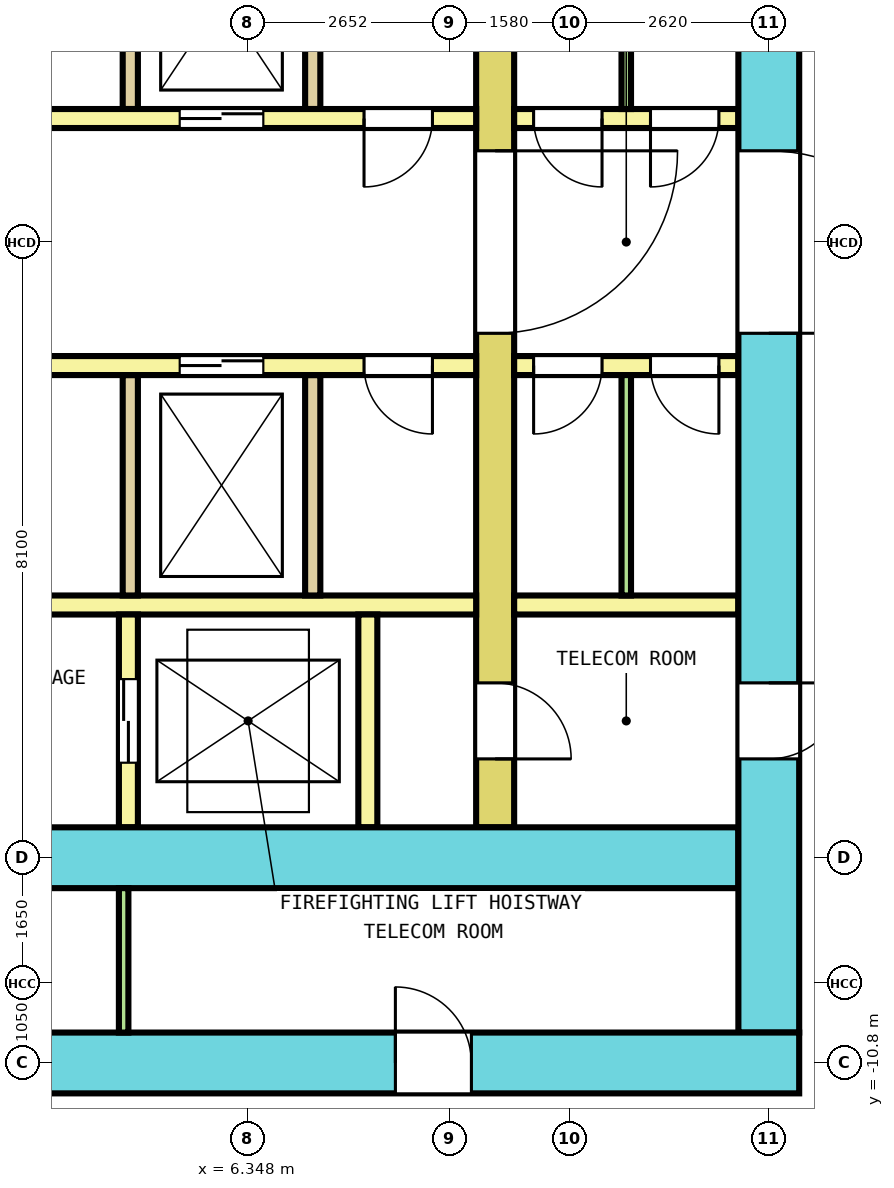
"""IFC4 building model, lengths in metres.
Left out: names, types, materials, properties, quantities, classifications, styles, units other than length and angle.
Written with IfcOpenShell. Run it as: python <this file> out.ifc"""

import sys

from ifc_helpers import new_model, si_unit, direction, frame, frame_2d, origin, place, context, subcontext, project, spatial, rectangle, extrude, element, fill, save


model = new_model("IFC4")
c1 = context("Model", 3, precision=1e-05, world=origin(), true_north=direction((0.0, 1.0)))
c2 = subcontext(c1, "Body", "Model", "MODEL_VIEW")
j1 = project(units=[si_unit("LENGTHUNIT", "METRE"), si_unit("PLANEANGLEUNIT", "RADIAN")], contexts=[c1])
p1 = place(None, origin())
s1 = spatial("IfcSite", under=j1, at=p1, CompositionType="ELEMENT")
p2 = place(p1, origin())
s2 = spatial("IfcBuilding", under=s1, at=p2, CompositionType="ELEMENT")
p3 = place(p2, frame((0.0, 0.0, 117.6)))
s3 = spatial("IfcBuildingStorey", under=s2, at=p3, CompositionType="ELEMENT", Elevation=117.6)
p4 = place(p3, frame((-13.6, -10.8, 0.0), z_axis=(0.0, 0.0, 1.0), x_axis=(1.0, 0.0, 0.0)))
e1 = element("IfcWall", 1, at=p4, inside=s3, PredefinedType="SHEAR", context=c2, shape_type="SweptSolid", body=[
    extrude(rectangle(XDim=27.2, YDim=0.8, at=frame_2d((13.6, 0.0))), origin(), (0.0, 0.0, 1.0), 4.1),
])
p5 = place(p4, frame((1.817, 0.0, 0.0)))
e2 = element("IfcOpeningElement", 2, at=p5, cuts=e1, PredefinedType="OPENING", context=c2, shape_type="SweptSolid", body=[
    extrude(rectangle(XDim=1.0, YDim=2.1, at=frame_2d((0.5, 1.05))), frame((0.0, 0.41, 0.0), z_axis=(0.0, -1.0, 0.0), x_axis=(1.0, 0.0, 0.0)), (0.0, 0.0, 1.0), 0.82),
])
p6 = place(p4, frame((4.945, 0.0, 0.0)))
e3 = element("IfcOpeningElement", 3, at=p6, cuts=e1, PredefinedType="OPENING", context=c2, shape_type="SweptSolid", body=[
    extrude(rectangle(XDim=1.0, YDim=2.1, at=frame_2d((0.5, 1.05))), frame((0.0, 0.41, 0.0), z_axis=(0.0, -1.0, 0.0), x_axis=(1.0, 0.0, 0.0)), (0.0, 0.0, 1.0), 0.82),
])
p7 = place(p4, frame((8.042, 0.0, 0.0)))
e4 = element("IfcOpeningElement", 4, at=p7, cuts=e1, PredefinedType="OPENING", context=c2, shape_type="SweptSolid", body=[
    extrude(rectangle(XDim=1.0, YDim=2.1, at=frame_2d((0.5, 1.05))), frame((0.0, 0.41, 0.0), z_axis=(0.0, -1.0, 0.0), x_axis=(1.0, 0.0, 0.0)), (0.0, 0.0, 1.0), 0.82),
])
p8 = place(p4, frame((11.139, 0.0, 0.0)))
e5 = element("IfcOpeningElement", 5, at=p8, cuts=e1, PredefinedType="OPENING", context=c2, shape_type="SweptSolid", body=[
    extrude(rectangle(XDim=1.0, YDim=2.1, at=frame_2d((0.5, 1.05))), frame((0.0, 0.41, 0.0), z_axis=(0.0, -1.0, 0.0), x_axis=(1.0, 0.0, 0.0)), (0.0, 0.0, 1.0), 0.82),
])
p9 = place(p4, frame((21.887, 0.0, 0.0)))
e6 = element("IfcOpeningElement", 6, at=p9, cuts=e1, PredefinedType="OPENING", context=c2, shape_type="SweptSolid", body=[
    extrude(rectangle(XDim=1.0, YDim=2.1, at=frame_2d((0.5, 1.05))), frame((0.0, 0.41, 0.0), z_axis=(0.0, -1.0, 0.0), x_axis=(1.0, 0.0, 0.0)), (0.0, 0.0, 1.0), 0.82),
])
p10 = place(p4, frame((15.15, 0.0, 0.0)))
e7 = element("IfcOpeningElement", 7, at=p10, cuts=e1, PredefinedType="OPENING", context=c2, shape_type="SweptSolid", body=[
    extrude(rectangle(XDim=1.2, YDim=2.1, at=frame_2d((0.6, 1.05))), frame((0.0, 0.41, 0.0), z_axis=(0.0, -1.0, 0.0), x_axis=(1.0, 0.0, 0.0)), (0.0, 0.0, 1.0), 0.82),
])
p11 = place(p3, frame((13.2, -10.4, 0.0), z_axis=(0.0, 0.0, 1.0), x_axis=(0.0, 1.0, 0.0)))
e8 = element("IfcWall", 8, at=p11, inside=s3, PredefinedType="SHEAR", context=c2, shape_type="SweptSolid", body=[
    extrude(rectangle(XDim=20.8, YDim=0.8, at=frame_2d((10.4, 0.0))), origin(), (0.0, 0.0, 1.0), 4.1),
])
p12 = place(p11, frame((9.2, 0.0, 0.0)))
e9 = element("IfcOpeningElement", 9, at=p12, cuts=e8, PredefinedType="OPENING", context=c2, shape_type="SweptSolid", body=[
    extrude(rectangle(XDim=2.4, YDim=2.1, at=frame_2d((1.2, 1.05))), frame((0.0, 0.41, 0.0), z_axis=(0.0, -1.0, 0.0), x_axis=(1.0, 0.0, 0.0)), (0.0, 0.0, 1.0), 0.82),
])
p13 = place(p11, frame((16.1, 0.0, 0.0)))
e10 = element("IfcOpeningElement", 10, at=p13, cuts=e8, PredefinedType="OPENING", context=c2, shape_type="SweptSolid", body=[
    extrude(rectangle(XDim=1.2, YDim=2.1, at=frame_2d((0.6, 1.05))), frame((0.0, 0.41, 0.0), z_axis=(0.0, -1.0, 0.0), x_axis=(1.0, 0.0, 0.0)), (0.0, 0.0, 1.0), 0.82),
])
p14 = place(p11, frame((3.6, 0.0, 0.0)))
e11 = element("IfcOpeningElement", 11, at=p14, cuts=e8, PredefinedType="OPENING", context=c2, shape_type="SweptSolid", body=[
    extrude(rectangle(XDim=1.0, YDim=2.1, at=frame_2d((0.5, 1.05))), frame((0.0, 0.41, 0.0), z_axis=(0.0, -1.0, 0.0), x_axis=(1.0, 0.0, 0.0)), (0.0, 0.0, 1.0), 0.82),
])
p15 = place(p3, frame((-12.8, -8.1, 0.0), z_axis=(0.0, 0.0, 1.0), x_axis=(1.0, 0.0, 0.0)))
e12 = element("IfcWall", 12, at=p15, inside=s3, PredefinedType="SHEAR", context=c2, shape_type="SweptSolid", body=[
    extrude(rectangle(XDim=25.6, YDim=0.8, at=frame_2d((12.8, 0.0))), origin(), (0.0, 0.0, 1.0), 4.1),
])
p16 = place(p15, frame((14.35, 0.0, 0.0)))
e13 = element("IfcOpeningElement", 13, at=p16, cuts=e12, PredefinedType="OPENING", context=c2, shape_type="SweptSolid", body=[
    extrude(rectangle(XDim=1.2, YDim=2.1, at=frame_2d((0.6, 1.05))), frame((0.0, 0.41, 0.0), z_axis=(0.0, -1.0, 0.0), x_axis=(1.0, 0.0, 0.0)), (0.0, 0.0, 1.0), 0.82),
])
p17 = place(p3, frame((9.6, -7.7, 0.0), z_axis=(0.0, 0.0, 1.0), x_axis=(0.0, 1.0, 0.0)))
e14 = element("IfcWall", 14, at=p17, inside=s3, PredefinedType="SHEAR", context=c2, shape_type="SweptSolid", body=[
    extrude(rectangle(XDim=15.4, YDim=0.5, at=frame_2d((7.7, 0.0))), origin(), (0.0, 0.0, 1.0), 4.1),
])
p18 = place(p17, frame((6.5, 0.0, 0.0)))
e15 = element("IfcOpeningElement", 15, at=p18, cuts=e14, PredefinedType="OPENING", context=c2, shape_type="SweptSolid", body=[
    extrude(rectangle(XDim=2.4, YDim=2.1, at=frame_2d((1.2, 1.05))), frame((0.0, 0.26, 0.0), z_axis=(0.0, -1.0, 0.0), x_axis=(1.0, 0.0, 0.0)), (0.0, 0.0, 1.0), 0.52),
])
p19 = place(p17, frame((13.4, 0.0, 0.0)))
e16 = element("IfcOpeningElement", 16, at=p19, cuts=e14, PredefinedType="OPENING", context=c2, shape_type="SweptSolid", body=[
    extrude(rectangle(XDim=1.2, YDim=2.1, at=frame_2d((0.6, 1.05))), frame((0.0, 0.26, 0.0), z_axis=(0.0, -1.0, 0.0), x_axis=(1.0, 0.0, 0.0)), (0.0, 0.0, 1.0), 0.52),
])
p20 = place(p17, frame((0.9, 0.0, 0.0)))
e17 = element("IfcOpeningElement", 17, at=p20, cuts=e14, PredefinedType="OPENING", context=c2, shape_type="SweptSolid", body=[
    extrude(rectangle(XDim=1.0, YDim=2.1, at=frame_2d((0.5, 1.05))), frame((0.0, 0.26, 0.0), z_axis=(0.0, -1.0, 0.0), x_axis=(1.0, 0.0, 0.0)), (0.0, 0.0, 1.0), 0.52),
])
p21 = place(p3, frame((-9.35, 1.625, 0.0), z_axis=(0.0, 0.0, 1.0), x_axis=(1.0, 0.0, 0.0)))
e18 = element("IfcWall", 18, at=p21, inside=s3, PredefinedType="SOLIDWALL", context=c2, shape_type="SweptSolid", body=[
    extrude(rectangle(XDim=18.7, YDim=0.25, at=frame_2d((9.35, 0.0))), origin(), (0.0, 0.0, 1.0), 4.1),
])
p22 = place(p21, frame((2.85, 0.0, 0.0)))
e19 = element("IfcOpeningElement", 19, at=p22, cuts=e18, PredefinedType="OPENING", context=c2, shape_type="SweptSolid", body=[
    extrude(rectangle(XDim=1.1, YDim=2.1, at=frame_2d((0.55, 1.05))), frame((0.0, 0.135, 0.0), z_axis=(0.0, -1.0, 0.0), x_axis=(1.0, 0.0, 0.0)), (0.0, 0.0, 1.0), 0.27),
])
p23 = place(p21, frame((5.15, 0.0, 0.0)))
e20 = element("IfcOpeningElement", 20, at=p23, cuts=e18, PredefinedType="OPENING", context=c2, shape_type="SweptSolid", body=[
    extrude(rectangle(XDim=1.1, YDim=2.1, at=frame_2d((0.55, 1.05))), frame((0.0, 0.135, 0.0), z_axis=(0.0, -1.0, 0.0), x_axis=(1.0, 0.0, 0.0)), (0.0, 0.0, 1.0), 0.27),
])
p24 = place(p21, frame((14.8, 0.0, 0.0)))
e21 = element("IfcOpeningElement", 21, at=p24, cuts=e18, PredefinedType="OPENING", context=c2, shape_type="SweptSolid", body=[
    extrude(rectangle(XDim=1.1, YDim=2.1, at=frame_2d((0.55, 1.05))), frame((0.0, 0.135, 0.0), z_axis=(0.0, -1.0, 0.0), x_axis=(1.0, 0.0, 0.0)), (0.0, 0.0, 1.0), 0.27),
])
p25 = place(p21, frame((0.575, 0.0, 0.0)))
e22 = element("IfcOpeningElement", 22, at=p25, cuts=e18, PredefinedType="OPENING", context=c2, shape_type="SweptSolid", body=[
    extrude(rectangle(XDim=0.9, YDim=2.1, at=frame_2d((0.45, 1.05))), frame((0.0, 0.135, 0.0), z_axis=(0.0, -1.0, 0.0), x_axis=(1.0, 0.0, 0.0)), (0.0, 0.0, 1.0), 0.27),
])
p26 = place(p21, frame((17.225, 0.0, 0.0)))
e23 = element("IfcOpeningElement", 23, at=p26, cuts=e18, PredefinedType="OPENING", context=c2, shape_type="SweptSolid", body=[
    extrude(rectangle(XDim=0.9, YDim=2.1, at=frame_2d((0.45, 1.05))), frame((0.0, 0.135, 0.0), z_axis=(0.0, -1.0, 0.0), x_axis=(1.0, 0.0, 0.0)), (0.0, 0.0, 1.0), 0.27),
])
p27 = place(p3, frame((9.85, 1.625, 0.0), z_axis=(0.0, 0.0, 1.0), x_axis=(1.0, 0.0, 0.0)))
e24 = element("IfcWall", 24, at=p27, inside=s3, PredefinedType="SOLIDWALL", context=c2, shape_type="SweptSolid", body=[
    extrude(rectangle(XDim=2.95, YDim=0.25, at=frame_2d((1.475, 0.0))), origin(), (0.0, 0.0, 1.0), 4.1),
])
p28 = place(p27, frame((0.256, 0.0, 0.0)))
e25 = element("IfcOpeningElement", 25, at=p28, cuts=e24, PredefinedType="OPENING", context=c2, shape_type="SweptSolid", body=[
    extrude(rectangle(XDim=0.9, YDim=2.1, at=frame_2d((0.45, 1.05))), frame((0.0, 0.135, 0.0), z_axis=(0.0, -1.0, 0.0), x_axis=(1.0, 0.0, 0.0)), (0.0, 0.0, 1.0), 0.27),
])
p29 = place(p27, frame((1.794, 0.0, 0.0)))
e26 = element("IfcOpeningElement", 26, at=p29, cuts=e24, PredefinedType="OPENING", context=c2, shape_type="SweptSolid", body=[
    extrude(rectangle(XDim=0.9, YDim=2.1, at=frame_2d((0.45, 1.05))), frame((0.0, 0.135, 0.0), z_axis=(0.0, -1.0, 0.0), x_axis=(1.0, 0.0, 0.0)), (0.0, 0.0, 1.0), 0.27),
])
for number, where, z_axis, x_axis in (
    (27, (4.8, 1.75, 0.0), (0.0, 0.0, 1.0), (0.0, 1.0, 0.0)),
    (28, (7.2, 1.75, 0.0), (0.0, 0.0, 1.0), (0.0, 1.0, 0.0)),
):
    element("IfcWall", number, at=place(p3, frame(where, z_axis=z_axis, x_axis=x_axis)), inside=s3, PredefinedType="SOLIDWALL", context=c2, shape_type="SweptSolid", body=[
        extrude(rectangle(XDim=2.9, YDim=0.2, at=frame_2d((1.45, 0.0))), origin(), (0.0, 0.0, 1.0), 4.1),
    ])
p30 = place(p3, frame((-9.35, -1.625, 0.0), z_axis=(0.0, 0.0, 1.0), x_axis=(1.0, 0.0, 0.0)))
e29 = element("IfcWall", 29, at=p30, inside=s3, PredefinedType="SOLIDWALL", context=c2, shape_type="SweptSolid", body=[
    extrude(rectangle(XDim=18.7, YDim=0.25, at=frame_2d((9.35, 0.0))), origin(), (0.0, 0.0, 1.0), 4.1),
])
p31 = place(p30, frame((2.85, 0.0, 0.0)))
e30 = element("IfcOpeningElement", 30, at=p31, cuts=e29, PredefinedType="OPENING", context=c2, shape_type="SweptSolid", body=[
    extrude(rectangle(XDim=1.1, YDim=2.1, at=frame_2d((0.55, 1.05))), frame((0.0, 0.135, 0.0), z_axis=(0.0, -1.0, 0.0), x_axis=(1.0, 0.0, 0.0)), (0.0, 0.0, 1.0), 0.27),
])
p32 = place(p30, frame((5.15, 0.0, 0.0)))
e31 = element("IfcOpeningElement", 31, at=p32, cuts=e29, PredefinedType="OPENING", context=c2, shape_type="SweptSolid", body=[
    extrude(rectangle(XDim=1.1, YDim=2.1, at=frame_2d((0.55, 1.05))), frame((0.0, 0.135, 0.0), z_axis=(0.0, -1.0, 0.0), x_axis=(1.0, 0.0, 0.0)), (0.0, 0.0, 1.0), 0.27),
])
p33 = place(p30, frame((14.8, 0.0, 0.0)))
e32 = element("IfcOpeningElement", 32, at=p33, cuts=e29, PredefinedType="OPENING", context=c2, shape_type="SweptSolid", body=[
    extrude(rectangle(XDim=1.1, YDim=2.1, at=frame_2d((0.55, 1.05))), frame((0.0, 0.135, 0.0), z_axis=(0.0, -1.0, 0.0), x_axis=(1.0, 0.0, 0.0)), (0.0, 0.0, 1.0), 0.27),
])
p34 = place(p30, frame((0.575, 0.0, 0.0)))
e33 = element("IfcOpeningElement", 33, at=p34, cuts=e29, PredefinedType="OPENING", context=c2, shape_type="SweptSolid", body=[
    extrude(rectangle(XDim=0.9, YDim=2.1, at=frame_2d((0.45, 1.05))), frame((0.0, 0.135, 0.0), z_axis=(0.0, -1.0, 0.0), x_axis=(1.0, 0.0, 0.0)), (0.0, 0.0, 1.0), 0.27),
])
p35 = place(p30, frame((17.225, 0.0, 0.0)))
e34 = element("IfcOpeningElement", 34, at=p35, cuts=e29, PredefinedType="OPENING", context=c2, shape_type="SweptSolid", body=[
    extrude(rectangle(XDim=0.9, YDim=2.1, at=frame_2d((0.45, 1.05))), frame((0.0, 0.135, 0.0), z_axis=(0.0, -1.0, 0.0), x_axis=(1.0, 0.0, 0.0)), (0.0, 0.0, 1.0), 0.27),
])
p36 = place(p3, frame((9.85, -1.625, 0.0), z_axis=(0.0, 0.0, 1.0), x_axis=(1.0, 0.0, 0.0)))
e35 = element("IfcWall", 35, at=p36, inside=s3, PredefinedType="SOLIDWALL", context=c2, shape_type="SweptSolid", body=[
    extrude(rectangle(XDim=2.95, YDim=0.25, at=frame_2d((1.475, 0.0))), origin(), (0.0, 0.0, 1.0), 4.1),
])
p37 = place(p36, frame((0.256, 0.0, 0.0)))
e36 = element("IfcOpeningElement", 36, at=p37, cuts=e35, PredefinedType="OPENING", context=c2, shape_type="SweptSolid", body=[
    extrude(rectangle(XDim=0.9, YDim=2.1, at=frame_2d((0.45, 1.05))), frame((0.0, 0.135, 0.0), z_axis=(0.0, -1.0, 0.0), x_axis=(1.0, 0.0, 0.0)), (0.0, 0.0, 1.0), 0.27),
])
p38 = place(p36, frame((1.794, 0.0, 0.0)))
e37 = element("IfcOpeningElement", 37, at=p38, cuts=e35, PredefinedType="OPENING", context=c2, shape_type="SweptSolid", body=[
    extrude(rectangle(XDim=0.9, YDim=2.1, at=frame_2d((0.45, 1.05))), frame((0.0, 0.135, 0.0), z_axis=(0.0, -1.0, 0.0), x_axis=(1.0, 0.0, 0.0)), (0.0, 0.0, 1.0), 0.27),
])
p39 = place(p3, frame((-9.35, -4.775, 0.0), z_axis=(0.0, 0.0, 1.0), x_axis=(1.0, 0.0, 0.0)))
e38 = element("IfcWall", 38, at=p39, inside=s3, PredefinedType="SOLIDWALL", context=c2, shape_type="SweptSolid", body=[
    extrude(rectangle(XDim=18.7, YDim=0.25, at=frame_2d((9.35, 0.0))), origin(), (0.0, 0.0, 1.0), 4.1),
])
p40 = place(p3, frame((9.85, -4.775, 0.0), z_axis=(0.0, 0.0, 1.0), x_axis=(1.0, 0.0, 0.0)))
e39 = element("IfcWall", 39, at=p40, inside=s3, PredefinedType="SOLIDWALL", context=c2, shape_type="SweptSolid", body=[
    extrude(rectangle(XDim=2.95, YDim=0.25, at=frame_2d((1.475, 0.0))), origin(), (0.0, 0.0, 1.0), 4.1),
])
for number, where, z_axis, x_axis in (
    (40, (4.8, -4.65, 0.0), (0.0, 0.0, 1.0), (0.0, 1.0, 0.0)),
    (41, (7.2, -4.65, 0.0), (0.0, 0.0, 1.0), (0.0, 1.0, 0.0)),
):
    element("IfcWall", number, at=place(p3, frame(where, z_axis=z_axis, x_axis=x_axis)), inside=s3, PredefinedType="SOLIDWALL", context=c2, shape_type="SweptSolid", body=[
        extrude(rectangle(XDim=2.9, YDim=0.2, at=frame_2d((1.45, 0.0))), origin(), (0.0, 0.0, 1.0), 4.1),
    ])
p41 = place(p3, frame((4.775, -7.7, 0.0), z_axis=(0.0, 0.0, 1.0), x_axis=(0.0, 1.0, 0.0)))
e42 = element("IfcWall", 42, at=p41, inside=s3, PredefinedType="SOLIDWALL", context=c2, shape_type="SweptSolid", body=[
    extrude(rectangle(XDim=2.8, YDim=0.25, at=frame_2d((1.4, 0.0))), origin(), (0.0, 0.0, 1.0), 4.1),
])
p42 = place(p41, frame((0.85, 0.0, 0.0)))
e43 = element("IfcOpeningElement", 43, at=p42, cuts=e42, PredefinedType="OPENING", context=c2, shape_type="SweptSolid", body=[
    extrude(rectangle(XDim=1.1, YDim=2.1, at=frame_2d((0.55, 1.05))), frame((0.0, 0.135, 0.0), z_axis=(0.0, -1.0, 0.0), x_axis=(1.0, 0.0, 0.0)), (0.0, 0.0, 1.0), 0.27),
])
p43 = place(p3, frame((7.925, -7.7, 0.0), z_axis=(0.0, 0.0, 1.0), x_axis=(0.0, 1.0, 0.0)))
e44 = element("IfcWall", 44, at=p43, inside=s3, PredefinedType="SOLIDWALL", context=c2, shape_type="SweptSolid", body=[
    extrude(rectangle(XDim=2.8, YDim=0.25, at=frame_2d((1.4, 0.0))), origin(), (0.0, 0.0, 1.0), 4.1),
])
p44 = place(p3, frame((4.712, -10.4, 0.0), z_axis=(0.0, 0.0, 1.0), x_axis=(0.0, 1.0, 0.0)))
e45 = element("IfcWall", 45, at=p44, inside=s3, PredefinedType="PARTITIONING", context=c2, shape_type="SweptSolid", body=[
    extrude(rectangle(XDim=1.9, YDim=0.125, at=frame_2d((0.95, 0.0))), origin(), (0.0, 0.0, 1.0), 3.05),
])
for number, where, z_axis, x_axis in (
    (46, (11.325, 1.75, 0.0), (0.0, 0.0, 1.0), (0.0, 1.0, 0.0)),
    (47, (11.325, -4.65, 0.0), (0.0, 0.0, 1.0), (0.0, 1.0, 0.0)),
):
    element("IfcWall", number, at=place(p3, frame(where, z_axis=z_axis, x_axis=x_axis)), inside=s3, PredefinedType="PARTITIONING", context=c2, shape_type="SweptSolid", body=[
        extrude(rectangle(XDim=2.9, YDim=0.125, at=frame_2d((1.45, 0.0))), origin(), (0.0, 0.0, 1.0), 4.1),
    ])
p45 = place(p24, origin())
e48 = element("IfcDoor", 48, at=p45, inside=s3, OperationType="DOUBLE_DOOR_SLIDING", PredefinedType="DOOR", context=c2, shape_type="SweptSolid", body=[
    extrude(rectangle(XDim=1.1, YDim=2.1, at=frame_2d((0.55, 1.05))), frame((0.0, 0.075, 0.0), z_axis=(0.0, -1.0, 0.0), x_axis=(1.0, 0.0, 0.0)), (0.0, 0.0, 1.0), 0.15),
])
fill(e21, e48)
p46 = place(p33, origin())
e49 = element("IfcDoor", 49, at=p46, inside=s3, OperationType="DOUBLE_DOOR_SLIDING", PredefinedType="DOOR", context=c2, shape_type="SweptSolid", body=[
    extrude(rectangle(XDim=1.1, YDim=2.1, at=frame_2d((0.55, 1.05))), frame((0.0, 0.075, 0.0), z_axis=(0.0, -1.0, 0.0), x_axis=(1.0, 0.0, 0.0)), (0.0, 0.0, 1.0), 0.15),
])
fill(e32, e49)
p47 = place(p42, origin())
e50 = element("IfcDoor", 50, at=p47, inside=s3, OperationType="DOUBLE_DOOR_SLIDING", PredefinedType="DOOR", context=c2, shape_type="SweptSolid", body=[
    extrude(rectangle(XDim=1.1, YDim=2.1, at=frame_2d((0.55, 1.05))), frame((0.0, 0.075, 0.0), z_axis=(0.0, -1.0, 0.0), x_axis=(1.0, 0.0, 0.0)), (0.0, 0.0, 1.0), 0.15),
])
fill(e43, e50)
p48 = place(p18, origin())
e51 = element("IfcDoor", 51, at=p48, inside=s3, OperationType="DOUBLE_DOOR_SINGLE_SWING", PredefinedType="DOOR", context=c2, shape_type="SweptSolid", body=[
    extrude(rectangle(XDim=2.4, YDim=2.1, at=frame_2d((1.2, 1.05))), frame((0.0, 0.2, 0.0), z_axis=(0.0, -1.0, 0.0), x_axis=(1.0, 0.0, 0.0)), (0.0, 0.0, 1.0), 0.4),
])
fill(e15, e51)
p49 = place(p12, origin())
e52 = element("IfcDoor", 52, at=p49, inside=s3, OperationType="DOUBLE_DOOR_SINGLE_SWING", PredefinedType="DOOR", context=c2, shape_type="SweptSolid", body=[
    extrude(rectangle(XDim=2.4, YDim=2.1, at=frame_2d((1.2, 1.05))), frame((0.0, 0.3, 0.0), z_axis=(0.0, -1.0, 0.0), x_axis=(1.0, 0.0, 0.0)), (0.0, 0.0, 1.0), 0.6),
])
fill(e9, e52)
p50 = place(p20, origin())
e53 = element("IfcDoor", 53, at=p50, inside=s3, OperationType="SINGLE_SWING_LEFT", PredefinedType="DOOR", context=c2, shape_type="SweptSolid", body=[
    extrude(rectangle(XDim=1.0, YDim=2.1, at=frame_2d((0.5, 1.05))), frame((0.0, 0.2, 0.0), z_axis=(0.0, -1.0, 0.0), x_axis=(1.0, 0.0, 0.0)), (0.0, 0.0, 1.0), 0.4),
])
fill(e17, e53)
p51 = place(p14, origin())
e54 = element("IfcDoor", 54, at=p51, inside=s3, OperationType="SINGLE_SWING_RIGHT", PredefinedType="DOOR", context=c2, shape_type="SweptSolid", body=[
    extrude(rectangle(XDim=1.0, YDim=2.1, at=frame_2d((0.5, 1.05))), frame((0.0, 0.3, 0.0), z_axis=(0.0, -1.0, 0.0), x_axis=(1.0, 0.0, 0.0)), (0.0, 0.0, 1.0), 0.6),
])
fill(e11, e54)
p52 = place(p9, origin())
e55 = element("IfcDoor", 55, at=p52, inside=s3, OperationType="SINGLE_SWING_RIGHT", PredefinedType="DOOR", context=c2, shape_type="SweptSolid", body=[
    extrude(rectangle(XDim=1.0, YDim=2.1, at=frame_2d((0.5, 1.05))), frame((0.0, 0.3, 0.0), z_axis=(0.0, -1.0, 0.0), x_axis=(1.0, 0.0, 0.0)), (0.0, 0.0, 1.0), 0.6),
])
fill(e6, e55)
p53 = place(p26, origin())
e56 = element("IfcDoor", 56, at=p53, inside=s3, OperationType="SINGLE_SWING_LEFT", PredefinedType="DOOR", context=c2, shape_type="SweptSolid", body=[
    extrude(rectangle(XDim=0.9, YDim=2.1, at=frame_2d((0.45, 1.05))), frame((0.0, 0.075, 0.0), z_axis=(0.0, -1.0, 0.0), x_axis=(1.0, 0.0, 0.0)), (0.0, 0.0, 1.0), 0.15),
])
fill(e23, e56)
p54 = place(p28, origin())
e57 = element("IfcDoor", 57, at=p54, inside=s3, OperationType="SINGLE_SWING_RIGHT", PredefinedType="DOOR", context=c2, shape_type="SweptSolid", body=[
    extrude(rectangle(XDim=0.9, YDim=2.1, at=frame_2d((0.45, 1.05))), frame((0.0, 0.075, 0.0), z_axis=(0.0, -1.0, 0.0), x_axis=(1.0, 0.0, 0.0)), (0.0, 0.0, 1.0), 0.15),
])
fill(e25, e57)
p55 = place(p29, origin())
e58 = element("IfcDoor", 58, at=p55, inside=s3, OperationType="SINGLE_SWING_LEFT", PredefinedType="DOOR", context=c2, shape_type="SweptSolid", body=[
    extrude(rectangle(XDim=0.9, YDim=2.1, at=frame_2d((0.45, 1.05))), frame((0.0, 0.075, 0.0), z_axis=(0.0, -1.0, 0.0), x_axis=(1.0, 0.0, 0.0)), (0.0, 0.0, 1.0), 0.15),
])
fill(e26, e58)
p56 = place(p35, origin())
e59 = element("IfcDoor", 59, at=p56, inside=s3, OperationType="SINGLE_SWING_LEFT", PredefinedType="DOOR", context=c2, shape_type="SweptSolid", body=[
    extrude(rectangle(XDim=0.9, YDim=2.1, at=frame_2d((0.45, 1.05))), frame((0.0, 0.075, 0.0), z_axis=(0.0, -1.0, 0.0), x_axis=(1.0, 0.0, 0.0)), (0.0, 0.0, 1.0), 0.15),
])
fill(e34, e59)
p57 = place(p37, origin())
e60 = element("IfcDoor", 60, at=p57, inside=s3, OperationType="SINGLE_SWING_RIGHT", PredefinedType="DOOR", context=c2, shape_type="SweptSolid", body=[
    extrude(rectangle(XDim=0.9, YDim=2.1, at=frame_2d((0.45, 1.05))), frame((0.0, 0.075, 0.0), z_axis=(0.0, -1.0, 0.0), x_axis=(1.0, 0.0, 0.0)), (0.0, 0.0, 1.0), 0.15),
])
fill(e36, e60)
p58 = place(p38, origin())
e61 = element("IfcDoor", 61, at=p58, inside=s3, OperationType="SINGLE_SWING_LEFT", PredefinedType="DOOR", context=c2, shape_type="SweptSolid", body=[
    extrude(rectangle(XDim=0.9, YDim=2.1, at=frame_2d((0.45, 1.05))), frame((0.0, 0.075, 0.0), z_axis=(0.0, -1.0, 0.0), x_axis=(1.0, 0.0, 0.0)), (0.0, 0.0, 1.0), 0.15),
])
fill(e37, e61)
save(model, sys.argv[1])
